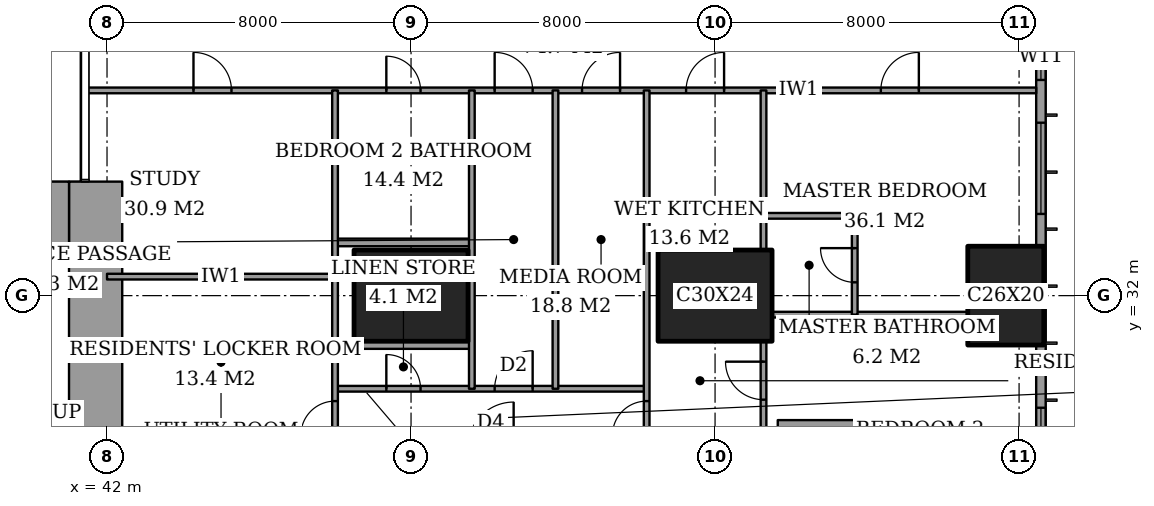
"""IFC4 building model, lengths in metres.
Left out: names, types, materials, properties, quantities, classifications, styles, units other than length and angle.
Written with IfcOpenShell. Run it as: python <this file> out.ifc"""

import sys

from ifc_helpers import new_model, si_unit, direction, frame, frame_2d, origin, origin_2d, place, context, subcontext, project, spatial, rectangle, extrude, element, fill, save


model = new_model("IFC4")
c1 = context("Model", 3, precision=1e-05, world=origin(), true_north=direction((0.0, 1.0)))
c2 = subcontext(c1, "Body", "Model", "MODEL_VIEW")
j1 = project(units=[si_unit("LENGTHUNIT", "METRE"), si_unit("PLANEANGLEUNIT", "RADIAN")], contexts=[c1])
p1 = place(None, origin())
s1 = spatial("IfcSite", under=j1, at=p1, CompositionType="ELEMENT")
p2 = place(p1, origin())
s2 = spatial("IfcBuilding", under=s1, at=p2, CompositionType="ELEMENT")
p3 = place(p2, frame((0.0, 0.0, 125.0)))
s3 = spatial("IfcBuildingStorey", under=s2, at=p3, CompositionType="ELEMENT", Elevation=125.0)
for number, where, z_axis, x_axis in (
    (1, (50.0, 32.0, 0.0), (0.0, 0.0, 1.0), (1.0, 0.0, 0.0)),
    (2, (58.0, 32.0, 0.0), (0.0, 0.0, 1.0), (1.0, 0.0, 0.0)),
):
    element("IfcColumn", number, at=place(p3, frame(where, z_axis=z_axis, x_axis=x_axis)), inside=s3, PredefinedType="COLUMN", context=c2, shape_type="SweptSolid", body=[
        extrude(rectangle(XDim=3.0, YDim=2.4, at=origin_2d()), origin(), (0.0, 0.0, 1.0), 3.6),
    ])
p4 = place(p3, frame((65.65, 32.0, 0.0), z_axis=(0.0, 0.0, 1.0), x_axis=(0.0, 1.0, 0.0)))
e3 = element("IfcColumn", 3, at=p4, inside=s3, PredefinedType="COLUMN", context=c2, shape_type="SweptSolid", body=[
    extrude(rectangle(XDim=2.6, YDim=2.0, at=origin_2d()), origin(), (0.0, 0.0, 1.0), 3.6),
])
p5 = place(p3, frame((37.85, 34.0, 0.0), z_axis=(0.0, 0.0, 1.0), x_axis=(1.0, 0.0, 0.0)))
e4 = element("IfcWall", 4, at=p5, inside=s3, PredefinedType="SHEAR", context=c2, shape_type="SweptSolid", body=[
    extrude(rectangle(XDim=3.15, YDim=2.0, at=frame_2d((1.575, 0.0))), origin(), (0.0, 0.0, 1.0), 3.6),
])
p6 = place(p3, frame((41.7, 24.85, 0.0), z_axis=(0.0, 0.0, 1.0), x_axis=(0.0, 1.0, 0.0)))
e5 = element("IfcWall", 5, at=p6, inside=s3, PredefinedType="SHEAR", context=c2, shape_type="SweptSolid", body=[
    extrude(rectangle(XDim=10.15, YDim=1.4, at=frame_2d((5.075, 0.0))), origin(), (0.0, 0.0, 1.0), 3.6),
])
p7 = place(p3, frame((64.1, 28.35, 0.0), z_axis=(0.0, 0.0, 1.0), x_axis=(-1.0, 0.0, 0.0)))
e6 = element("IfcWall", 6, at=p7, inside=s3, PredefinedType="SHEAR", context=c2, shape_type="SweptSolid", body=[
    extrude(rectangle(XDim=4.45, YDim=0.75, at=frame_2d((2.225, 0.0))), origin(), (0.0, 0.0, 1.0), 3.6),
])
p8 = place(p3, frame((66.575, 3.175, 0.0), z_axis=(0.0, 0.0, 1.0), x_axis=(0.0, 1.0, 0.0)))
e7 = element("IfcWall", 7, at=p8, inside=s3, PredefinedType="SOLIDWALL", context=c2, shape_type="SweptSolid", body=[
    extrude(rectangle(XDim=41.65, YDim=0.25, at=frame_2d((20.825, 0.0))), origin(), (0.0, 0.0, 1.0), 3.6),
])
p9 = place(p8, frame((0.775, 0.0, 0.4)))
e8 = element("IfcOpeningElement", 8, at=p9, cuts=e7, PredefinedType="OPENING", context=c2, shape_type="SweptSolid", body=[
    extrude(rectangle(XDim=2.4, YDim=2.2, at=frame_2d((1.2, 1.1))), frame((0.0, 0.135, 0.0), z_axis=(0.0, -1.0, 0.0), x_axis=(1.0, 0.0, 0.0)), (0.0, 0.0, 1.0), 0.27),
])
p10 = place(p8, frame((6.125, 0.0, 0.4)))
e9 = element("IfcOpeningElement", 9, at=p10, cuts=e7, PredefinedType="OPENING", context=c2, shape_type="SweptSolid", body=[
    extrude(rectangle(XDim=1.2, YDim=2.2, at=frame_2d((0.6, 1.1))), frame((0.0, 0.135, 0.0), z_axis=(0.0, -1.0, 0.0), x_axis=(1.0, 0.0, 0.0)), (0.0, 0.0, 1.0), 0.27),
])
p11 = place(p8, frame((8.375, 0.0, 0.4)))
e10 = element("IfcOpeningElement", 10, at=p11, cuts=e7, PredefinedType="OPENING", context=c2, shape_type="SweptSolid", body=[
    extrude(rectangle(XDim=2.4, YDim=2.2, at=frame_2d((1.2, 1.1))), frame((0.0, 0.135, 0.0), z_axis=(0.0, -1.0, 0.0), x_axis=(1.0, 0.0, 0.0)), (0.0, 0.0, 1.0), 0.27),
])
p12 = place(p8, frame((15.775, 0.0, 0.4)))
e11 = element("IfcOpeningElement", 11, at=p12, cuts=e7, PredefinedType="OPENING", context=c2, shape_type="SweptSolid", body=[
    extrude(rectangle(XDim=2.4, YDim=2.2, at=frame_2d((1.2, 1.1))), frame((0.0, 0.135, 0.0), z_axis=(0.0, -1.0, 0.0), x_axis=(1.0, 0.0, 0.0)), (0.0, 0.0, 1.0), 0.27),
])
p13 = place(p8, frame((23.475, 0.0, 0.4)))
e12 = element("IfcOpeningElement", 12, at=p13, cuts=e7, PredefinedType="OPENING", context=c2, shape_type="SweptSolid", body=[
    extrude(rectangle(XDim=2.4, YDim=2.2, at=frame_2d((1.2, 1.1))), frame((0.0, 0.135, 0.0), z_axis=(0.0, -1.0, 0.0), x_axis=(1.0, 0.0, 0.0)), (0.0, 0.0, 1.0), 0.27),
])
p14 = place(p8, frame((30.975, 0.0, 0.4)))
e13 = element("IfcOpeningElement", 13, at=p14, cuts=e7, PredefinedType="OPENING", context=c2, shape_type="SweptSolid", body=[
    extrude(rectangle(XDim=2.4, YDim=2.2, at=frame_2d((1.2, 1.1))), frame((0.0, 0.135, 0.0), z_axis=(0.0, -1.0, 0.0), x_axis=(1.0, 0.0, 0.0)), (0.0, 0.0, 1.0), 0.27),
])
p15 = place(p8, frame((34.5, 0.0, 0.4)))
e14 = element("IfcOpeningElement", 14, at=p15, cuts=e7, PredefinedType="OPENING", context=c2, shape_type="SweptSolid", body=[
    extrude(rectangle(XDim=1.2, YDim=2.2, at=frame_2d((0.6, 1.1))), frame((0.0, 0.135, 0.0), z_axis=(0.0, -1.0, 0.0), x_axis=(1.0, 0.0, 0.0)), (0.0, 0.0, 1.0), 0.27),
])
p16 = place(p8, frame((38.475, 0.0, 0.4)))
e15 = element("IfcOpeningElement", 15, at=p16, cuts=e7, PredefinedType="OPENING", context=c2, shape_type="SweptSolid", body=[
    extrude(rectangle(XDim=2.4, YDim=2.2, at=frame_2d((1.2, 1.1))), frame((0.0, 0.135, 0.0), z_axis=(0.0, -1.0, 0.0), x_axis=(1.0, 0.0, 0.0)), (0.0, 0.0, 1.0), 0.27),
])
p17 = place(p3, frame((48.0, 29.55, 0.0), z_axis=(0.0, 0.0, 1.0), x_axis=(1.0, 0.0, 0.0)))
e16 = element("IfcWall", 16, at=p17, inside=s3, PredefinedType="PARTITIONING", context=c2, shape_type="SweptSolid", body=[
    extrude(rectangle(XDim=8.2, YDim=0.15, at=frame_2d((4.1, 0.0))), origin(), (0.0, 0.0, 1.0), 3.35),
])
p18 = place(p17, frame((4.2, 0.0, 0.0)))
e17 = element("IfcOpeningElement", 17, at=p18, cuts=e16, PredefinedType="OPENING", context=c2, shape_type="SweptSolid", body=[
    extrude(rectangle(XDim=1.0, YDim=2.1, at=frame_2d((0.5, 1.05))), frame((0.0, 0.085, 0.0), z_axis=(0.0, -1.0, 0.0), x_axis=(1.0, 0.0, 0.0)), (0.0, 0.0, 1.0), 0.17),
])
p19 = place(p17, frame((1.35, 0.0, 0.0)))
e18 = element("IfcOpeningElement", 18, at=p19, cuts=e16, PredefinedType="OPENING", context=c2, shape_type="SweptSolid", body=[
    extrude(rectangle(XDim=0.9, YDim=2.1, at=frame_2d((0.45, 1.05))), frame((0.0, 0.085, 0.0), z_axis=(0.0, -1.0, 0.0), x_axis=(1.0, 0.0, 0.0)), (0.0, 0.0, 1.0), 0.17),
])
p20 = place(p3, frame((48.0, 30.7, 0.0), z_axis=(0.0, 0.0, 1.0), x_axis=(1.0, 0.0, 0.0)))
e19 = element("IfcWall", 19, at=p20, inside=s3, PredefinedType="PARTITIONING", context=c2, shape_type="SweptSolid", body=[
    extrude(rectangle(XDim=3.6, YDim=0.2, at=frame_2d((1.8, 0.0))), origin(), (0.0, 0.0, 1.0), 3.35),
])
p21 = place(p3, frame((59.5, 31.5, 0.0), z_axis=(0.0, 0.0, 1.0), x_axis=(1.0, 0.0, 0.0)))
e20 = element("IfcWall", 20, at=p21, inside=s3, PredefinedType="PARTITIONING", context=c2, shape_type="SweptSolid", body=[
    extrude(rectangle(XDim=5.15, YDim=0.15, at=frame_2d((2.575, 0.0))), origin(), (0.0, 0.0, 1.0), 3.35),
])
p22 = place(p3, frame((42.0, 32.5, 0.0), z_axis=(0.0, 0.0, 1.0), x_axis=(1.0, 0.0, 0.0)))
e21 = element("IfcWall", 21, at=p22, inside=s3, PredefinedType="PARTITIONING", context=c2, shape_type="SweptSolid", body=[
    extrude(rectangle(XDim=6.0, YDim=0.15, at=frame_2d((3.0, 0.0))), origin(), (0.0, 0.0, 1.0), 3.35),
])
p23 = place(p3, frame((48.0, 33.4, 0.0), z_axis=(0.0, 0.0, 1.0), x_axis=(1.0, 0.0, 0.0)))
e22 = element("IfcWall", 22, at=p23, inside=s3, PredefinedType="PARTITIONING", context=c2, shape_type="SweptSolid", body=[
    extrude(rectangle(XDim=3.6, YDim=0.2, at=frame_2d((1.8, 0.0))), origin(), (0.0, 0.0, 1.0), 3.35),
])
p24 = place(p3, frame((59.275, 34.1, 0.0), z_axis=(0.0, 0.0, 1.0), x_axis=(1.0, 0.0, 0.0)))
e23 = element("IfcWall", 23, at=p24, inside=s3, PredefinedType="PARTITIONING", context=c2, shape_type="SweptSolid", body=[
    extrude(rectangle(XDim=2.4, YDim=0.15, at=frame_2d((1.2, 0.0))), origin(), (0.0, 0.0, 1.0), 3.35),
])
p25 = place(p3, frame((41.439, 37.4, 0.0), z_axis=(0.0, 0.0, 1.0), x_axis=(1.0, 0.0, 0.0)))
e24 = element("IfcWall", 24, at=p25, inside=s3, PredefinedType="PARTITIONING", context=c2, shape_type="SweptSolid", body=[
    extrude(rectangle(XDim=25.011, YDim=0.15, at=frame_2d((12.505, 0.0))), origin(), (0.0, 0.0, 1.0), 3.35),
])
p26 = place(p25, frame((10.761, 0.0, 0.0)))
e25 = element("IfcOpeningElement", 25, at=p26, cuts=e24, PredefinedType="OPENING", context=c2, shape_type="SweptSolid", body=[
    extrude(rectangle(XDim=1.0, YDim=2.1, at=frame_2d((0.5, 1.05))), frame((0.0, 0.085, 0.0), z_axis=(0.0, -1.0, 0.0), x_axis=(1.0, 0.0, 0.0)), (0.0, 0.0, 1.0), 0.17),
])
p27 = place(p25, frame((20.924, 0.0, 0.0)))
e26 = element("IfcOpeningElement", 26, at=p27, cuts=e24, PredefinedType="OPENING", context=c2, shape_type="SweptSolid", body=[
    extrude(rectangle(XDim=1.0, YDim=2.1, at=frame_2d((0.5, 1.05))), frame((0.0, 0.085, 0.0), z_axis=(0.0, -1.0, 0.0), x_axis=(1.0, 0.0, 0.0)), (0.0, 0.0, 1.0), 0.17),
])
p28 = place(p25, frame((15.799, 0.0, 0.0)))
e27 = element("IfcOpeningElement", 27, at=p28, cuts=e24, PredefinedType="OPENING", context=c2, shape_type="SweptSolid", body=[
    extrude(rectangle(XDim=1.0, YDim=2.1, at=frame_2d((0.5, 1.05))), frame((0.0, 0.085, 0.0), z_axis=(0.0, -1.0, 0.0), x_axis=(1.0, 0.0, 0.0)), (0.0, 0.0, 1.0), 0.17),
])
p29 = place(p25, frame((13.061, 0.0, 0.0)))
e28 = element("IfcOpeningElement", 28, at=p29, cuts=e24, PredefinedType="OPENING", context=c2, shape_type="SweptSolid", body=[
    extrude(rectangle(XDim=1.0, YDim=2.1, at=frame_2d((0.5, 1.05))), frame((0.0, 0.085, 0.0), z_axis=(0.0, -1.0, 0.0), x_axis=(1.0, 0.0, 0.0)), (0.0, 0.0, 1.0), 0.17),
])
p30 = place(p25, frame((7.911, 0.0, 0.0)))
e29 = element("IfcOpeningElement", 29, at=p30, cuts=e24, PredefinedType="OPENING", context=c2, shape_type="SweptSolid", body=[
    extrude(rectangle(XDim=0.9, YDim=2.1, at=frame_2d((0.45, 1.05))), frame((0.0, 0.085, 0.0), z_axis=(0.0, -1.0, 0.0), x_axis=(1.0, 0.0, 0.0)), (0.0, 0.0, 1.0), 0.17),
])
p31 = place(p25, frame((2.836, 0.0, 0.0)))
e30 = element("IfcOpeningElement", 30, at=p31, cuts=e24, PredefinedType="OPENING", context=c2, shape_type="SweptSolid", body=[
    extrude(rectangle(XDim=1.0, YDim=2.1, at=frame_2d((0.5, 1.05))), frame((0.0, 0.085, 0.0), z_axis=(0.0, -1.0, 0.0), x_axis=(1.0, 0.0, 0.0)), (0.0, 0.0, 1.0), 0.17),
])
p32 = place(p3, frame((48.0, 28.0, 0.0), z_axis=(0.0, 0.0, 1.0), x_axis=(0.0, 1.0, 0.0)))
e31 = element("IfcWall", 31, at=p32, inside=s3, PredefinedType="PARTITIONING", context=c2, shape_type="SweptSolid", body=[
    extrude(rectangle(XDim=9.4, YDim=0.15, at=frame_2d((4.7, 0.0))), origin(), (0.0, 0.0, 1.0), 3.35),
])
p33 = place(p32, frame((0.325, 0.0, 0.0)))
e32 = element("IfcOpeningElement", 32, at=p33, cuts=e31, PredefinedType="OPENING", context=c2, shape_type="SweptSolid", body=[
    extrude(rectangle(XDim=0.9, YDim=2.1, at=frame_2d((0.45, 1.05))), frame((0.0, 0.085, 0.0), z_axis=(0.0, -1.0, 0.0), x_axis=(1.0, 0.0, 0.0)), (0.0, 0.0, 1.0), 0.17),
])
for number, where, z_axis, x_axis in (
    (33, (51.6, 29.55, 0.0), (0.0, 0.0, 1.0), (0.0, 1.0, 0.0)),
    (34, (53.8, 29.55, 0.0), (0.0, 0.0, 1.0), (0.0, 1.0, 0.0)),
):
    element("IfcWall", number, at=place(p3, frame(where, z_axis=z_axis, x_axis=x_axis)), inside=s3, PredefinedType="PARTITIONING", context=c2, shape_type="SweptSolid", body=[
        extrude(rectangle(XDim=7.85, YDim=0.15, at=frame_2d((3.925, 0.0))), origin(), (0.0, 0.0, 1.0), 3.35),
    ])
p34 = place(p3, frame((56.2, 28.0, 0.0), z_axis=(0.0, 0.0, 1.0), x_axis=(0.0, 1.0, 0.0)))
e35 = element("IfcWall", 35, at=p34, inside=s3, PredefinedType="PARTITIONING", context=c2, shape_type="SweptSolid", body=[
    extrude(rectangle(XDim=9.4, YDim=0.15, at=frame_2d((4.7, 0.0))), origin(), (0.0, 0.0, 1.0), 3.35),
])
p35 = place(p34, frame((0.325, 0.0, 0.0)))
e36 = element("IfcOpeningElement", 36, at=p35, cuts=e35, PredefinedType="OPENING", context=c2, shape_type="SweptSolid", body=[
    extrude(rectangle(XDim=0.9, YDim=2.1, at=frame_2d((0.45, 1.05))), frame((0.0, 0.085, 0.0), z_axis=(0.0, -1.0, 0.0), x_axis=(1.0, 0.0, 0.0)), (0.0, 0.0, 1.0), 0.17),
])
p36 = place(p3, frame((59.275, 28.35, 0.0), z_axis=(0.0, 0.0, 1.0), x_axis=(0.0, 1.0, 0.0)))
e37 = element("IfcWall", 37, at=p36, inside=s3, PredefinedType="PARTITIONING", context=c2, shape_type="SweptSolid", body=[
    extrude(rectangle(XDim=2.45, YDim=0.15, at=frame_2d((1.225, 0.0))), origin(), (0.0, 0.0, 1.0), 3.35),
])
p37 = place(p36, frame((0.913, 0.0, 0.0)))
e38 = element("IfcOpeningElement", 38, at=p37, cuts=e37, PredefinedType="OPENING", context=c2, shape_type="SweptSolid", body=[
    extrude(rectangle(XDim=1.0, YDim=2.1, at=frame_2d((0.5, 1.05))), frame((0.0, 0.085, 0.0), z_axis=(0.0, -1.0, 0.0), x_axis=(1.0, 0.0, 0.0)), (0.0, 0.0, 1.0), 0.17),
])
p38 = place(p3, frame((59.275, 33.2, 0.0), z_axis=(0.0, 0.0, 1.0), x_axis=(0.0, 1.0, 0.0)))
e39 = element("IfcWall", 39, at=p38, inside=s3, PredefinedType="PARTITIONING", context=c2, shape_type="SweptSolid", body=[
    extrude(rectangle(XDim=4.2, YDim=0.15, at=frame_2d((2.1, 0.0))), origin(), (0.0, 0.0, 1.0), 3.35),
])
p39 = place(p3, frame((61.675, 31.5, 0.0), z_axis=(0.0, 0.0, 1.0), x_axis=(0.0, 1.0, 0.0)))
e40 = element("IfcWall", 40, at=p39, inside=s3, PredefinedType="PARTITIONING", context=c2, shape_type="SweptSolid", body=[
    extrude(rectangle(XDim=2.6, YDim=0.15, at=frame_2d((1.3, 0.0))), origin(), (0.0, 0.0, 1.0), 3.35),
])
p40 = place(p39, frame((0.85, 0.0, 0.0)))
e41 = element("IfcOpeningElement", 41, at=p40, cuts=e40, PredefinedType="OPENING", context=c2, shape_type="SweptSolid", body=[
    extrude(rectangle(XDim=0.9, YDim=2.1, at=frame_2d((0.45, 1.05))), frame((0.0, 0.085, 0.0), z_axis=(0.0, -1.0, 0.0), x_axis=(1.0, 0.0, 0.0)), (0.0, 0.0, 1.0), 0.17),
])
p41 = place(p13, origin())
e42 = element("IfcWindow", 42, at=p41, inside=s3, PartitioningType="SINGLE_PANEL", PredefinedType="WINDOW", context=c2, shape_type="SweptSolid", body=[
    extrude(rectangle(XDim=2.4, YDim=2.2, at=frame_2d((1.2, 1.1))), frame((0.0, 0.03, 0.0), z_axis=(0.0, -1.0, 0.0), x_axis=(1.0, 0.0, 0.0)), (0.0, 0.0, 1.0), 0.06),
])
fill(e12, e42)
p42 = place(p14, origin())
e43 = element("IfcWindow", 43, at=p42, inside=s3, PartitioningType="SINGLE_PANEL", PredefinedType="WINDOW", context=c2, shape_type="SweptSolid", body=[
    extrude(rectangle(XDim=2.4, YDim=2.2, at=frame_2d((1.2, 1.1))), frame((0.0, 0.03, 0.0), z_axis=(0.0, -1.0, 0.0), x_axis=(1.0, 0.0, 0.0)), (0.0, 0.0, 1.0), 0.06),
])
fill(e13, e43)
p43 = place(p15, origin())
e44 = element("IfcWindow", 44, at=p43, inside=s3, PartitioningType="SINGLE_PANEL", PredefinedType="WINDOW", context=c2, shape_type="SweptSolid", body=[
    extrude(rectangle(XDim=1.2, YDim=2.2, at=frame_2d((0.6, 1.1))), frame((0.0, 0.03, 0.0), z_axis=(0.0, -1.0, 0.0), x_axis=(1.0, 0.0, 0.0)), (0.0, 0.0, 1.0), 0.06),
])
fill(e14, e44)
p44 = place(p26, origin())
e45 = element("IfcDoor", 45, at=p44, inside=s3, OperationType="SINGLE_SWING_RIGHT", PredefinedType="DOOR", context=c2, shape_type="SweptSolid", body=[
    extrude(rectangle(XDim=1.0, YDim=2.1, at=frame_2d((0.5, 1.05))), frame((0.0, 0.025, 0.0), z_axis=(0.0, -1.0, 0.0), x_axis=(1.0, 0.0, 0.0)), (0.0, 0.0, 1.0), 0.05),
])
fill(e25, e45)
p45 = place(p40, origin())
e46 = element("IfcDoor", 46, at=p45, inside=s3, OperationType="SINGLE_SWING_LEFT", PredefinedType="DOOR", context=c2, shape_type="SweptSolid", body=[
    extrude(rectangle(XDim=0.9, YDim=2.1, at=frame_2d((0.45, 1.05))), frame((0.0, 0.025, 0.0), z_axis=(0.0, -1.0, 0.0), x_axis=(1.0, 0.0, 0.0)), (0.0, 0.0, 1.0), 0.05),
])
fill(e41, e46)
p46 = place(p27, origin())
e47 = element("IfcDoor", 47, at=p46, inside=s3, OperationType="SINGLE_SWING_LEFT", PredefinedType="DOOR", context=c2, shape_type="SweptSolid", body=[
    extrude(rectangle(XDim=1.0, YDim=2.1, at=frame_2d((0.5, 1.05))), frame((0.0, 0.025, 0.0), z_axis=(0.0, -1.0, 0.0), x_axis=(1.0, 0.0, 0.0)), (0.0, 0.0, 1.0), 0.05),
])
fill(e26, e47)
p47 = place(p37, origin())
e48 = element("IfcDoor", 48, at=p47, inside=s3, OperationType="SINGLE_SWING_LEFT", PredefinedType="DOOR", context=c2, shape_type="SweptSolid", body=[
    extrude(rectangle(XDim=1.0, YDim=2.1, at=frame_2d((0.5, 1.05))), frame((0.0, 0.025, 0.0), z_axis=(0.0, -1.0, 0.0), x_axis=(1.0, 0.0, 0.0)), (0.0, 0.0, 1.0), 0.05),
])
fill(e38, e48)
p48 = place(p28, origin())
e49 = element("IfcDoor", 49, at=p48, inside=s3, OperationType="SINGLE_SWING_LEFT", PredefinedType="DOOR", context=c2, shape_type="SweptSolid", body=[
    extrude(rectangle(XDim=1.0, YDim=2.1, at=frame_2d((0.5, 1.05))), frame((0.0, 0.025, 0.0), z_axis=(0.0, -1.0, 0.0), x_axis=(1.0, 0.0, 0.0)), (0.0, 0.0, 1.0), 0.05),
])
fill(e27, e49)
p49 = place(p35, origin())
e50 = element("IfcDoor", 50, at=p49, inside=s3, OperationType="SINGLE_SWING_RIGHT", PredefinedType="DOOR", context=c2, shape_type="SweptSolid", body=[
    extrude(rectangle(XDim=0.9, YDim=2.1, at=frame_2d((0.45, 1.05))), frame((0.0, 0.025, 0.0), z_axis=(0.0, -1.0, 0.0), x_axis=(1.0, 0.0, 0.0)), (0.0, 0.0, 1.0), 0.05),
])
fill(e36, e50)
p50 = place(p29, origin())
e51 = element("IfcDoor", 51, at=p50, inside=s3, OperationType="SINGLE_SWING_LEFT", PredefinedType="DOOR", context=c2, shape_type="SweptSolid", body=[
    extrude(rectangle(XDim=1.0, YDim=2.1, at=frame_2d((0.5, 1.05))), frame((0.0, 0.025, 0.0), z_axis=(0.0, -1.0, 0.0), x_axis=(1.0, 0.0, 0.0)), (0.0, 0.0, 1.0), 0.05),
])
fill(e28, e51)
p51 = place(p18, origin())
e52 = element("IfcDoor", 52, at=p51, inside=s3, OperationType="SINGLE_SWING_LEFT", PredefinedType="DOOR", context=c2, shape_type="SweptSolid", body=[
    extrude(rectangle(XDim=1.0, YDim=2.1, at=frame_2d((0.5, 1.05))), frame((0.0, 0.025, 0.0), z_axis=(0.0, -1.0, 0.0), x_axis=(1.0, 0.0, 0.0)), (0.0, 0.0, 1.0), 0.05),
])
fill(e17, e52)
p52 = place(p19, origin())
e53 = element("IfcDoor", 53, at=p52, inside=s3, OperationType="SINGLE_SWING_RIGHT", PredefinedType="DOOR", context=c2, shape_type="SweptSolid", body=[
    extrude(rectangle(XDim=0.9, YDim=2.1, at=frame_2d((0.45, 1.05))), frame((0.0, 0.025, 0.0), z_axis=(0.0, -1.0, 0.0), x_axis=(1.0, 0.0, 0.0)), (0.0, 0.0, 1.0), 0.05),
])
fill(e18, e53)
p53 = place(p30, origin())
e54 = element("IfcDoor", 54, at=p53, inside=s3, OperationType="SINGLE_SWING_RIGHT", PredefinedType="DOOR", context=c2, shape_type="SweptSolid", body=[
    extrude(rectangle(XDim=0.9, YDim=2.1, at=frame_2d((0.45, 1.05))), frame((0.0, 0.025, 0.0), z_axis=(0.0, -1.0, 0.0), x_axis=(1.0, 0.0, 0.0)), (0.0, 0.0, 1.0), 0.05),
])
fill(e29, e54)
p54 = place(p31, origin())
e55 = element("IfcDoor", 55, at=p54, inside=s3, OperationType="SINGLE_SWING_RIGHT", PredefinedType="DOOR", context=c2, shape_type="SweptSolid", body=[
    extrude(rectangle(XDim=1.0, YDim=2.1, at=frame_2d((0.5, 1.05))), frame((0.0, 0.025, 0.0), z_axis=(0.0, -1.0, 0.0), x_axis=(1.0, 0.0, 0.0)), (0.0, 0.0, 1.0), 0.05),
])
fill(e30, e55)
p55 = place(p33, origin())
e56 = element("IfcDoor", 56, at=p55, inside=s3, OperationType="SINGLE_SWING_RIGHT", PredefinedType="DOOR", context=c2, shape_type="SweptSolid", body=[
    extrude(rectangle(XDim=0.9, YDim=2.1, at=frame_2d((0.45, 1.05))), frame((0.0, 0.025, 0.0), z_axis=(0.0, -1.0, 0.0), x_axis=(1.0, 0.0, 0.0)), (0.0, 0.0, 1.0), 0.05),
])
fill(e32, e56)
save(model, sys.argv[1])
